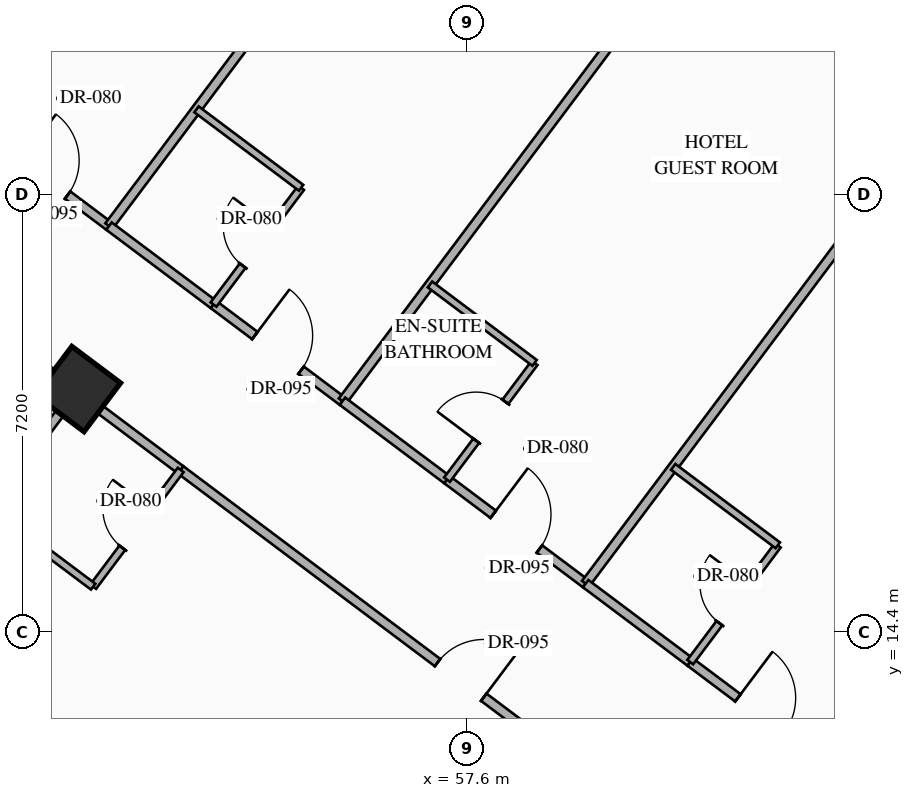
"""IFC4 building model, lengths in metres.
Left out: names, types, materials, properties, quantities, classifications, styles, units other than length and angle.
Written with IfcOpenShell. Run it as: python <this file> out.ifc"""

import sys

from ifc_helpers import new_model, si_unit, direction, frame, frame_2d, origin, origin_2d, place, context, subcontext, project, spatial, rectangle, hollow_rectangle, extrude, element, fill, save


model = new_model("IFC4")
c1 = context("Model", 3, precision=1e-05, world=origin(), true_north=direction((0.0, 1.0)))
c2 = subcontext(c1, "Body", "Model", "MODEL_VIEW")
j1 = project(units=[si_unit("LENGTHUNIT", "METRE"), si_unit("PLANEANGLEUNIT", "RADIAN")], contexts=[c1])
p1 = place(None, origin())
s1 = spatial("IfcSite", under=j1, at=p1, CompositionType="ELEMENT")
p2 = place(p1, origin())
s2 = spatial("IfcBuilding", under=s1, at=p2, CompositionType="ELEMENT")
p3 = place(p2, frame((0.0, 0.0, 43.3)))
s3 = spatial("IfcBuildingStorey", under=s2, at=p3, CompositionType="ELEMENT", Elevation=43.3)
p4 = place(p3, frame((51.2, 18.4, 0.0), z_axis=(0.0, 0.0, 1.0), x_axis=(0.799999996291, -0.600000004945, 0.0)))
e1 = element("IfcColumn", 1, at=p4, inside=s3, PredefinedType="COLUMN", context=c2, shape_type="SweptSolid", body=[
    extrude(hollow_rectangle(XDim=1.0, YDim=1.0, WallThickness=0.038, at=origin_2d()), origin(), (0.0, 0.0, 1.0), 3.35),
])
p5 = place(p3, frame((44.86, 40.73, 0.0), z_axis=(0.0, 0.0, 1.0), x_axis=(0.800006902154, -0.599990797017, 0.0)))
e2 = element("IfcWall", 2, at=p5, inside=s3, PredefinedType="STANDARD", context=c2, shape_type="SweptSolid", body=[
    extrude(rectangle(XDim=29.712, YDim=0.28, at=frame_2d((14.856, 0.0))), origin(), (0.0, 0.0, 1.0), 3.13),
])
p6 = place(p5, frame((14.249, 0.0, 0.0)))
e3 = element("IfcOpeningElement", 3, at=p6, cuts=e2, PredefinedType="OPENING", context=c2, shape_type="SweptSolid", body=[
    extrude(rectangle(XDim=1.1, YDim=2.2, at=frame_2d((0.55, 1.1))), frame((0.0, 0.15, 0.0), z_axis=(0.0, -1.0, 0.0), x_axis=(1.0, 0.0, 0.0)), (0.0, 0.0, 1.0), 0.3),
])
p7 = place(p5, frame((1.612, 0.0, 0.85)))
e4 = element("IfcOpeningElement", 4, at=p7, cuts=e2, PredefinedType="OPENING", context=c2, shape_type="SweptSolid", body=[
    extrude(rectangle(XDim=1.4, YDim=1.8, at=frame_2d((0.7, 0.9))), frame((0.0, 0.15, 0.0), z_axis=(0.0, -1.0, 0.0), x_axis=(1.0, 0.0, 0.0)), (0.0, 0.0, 1.0), 0.3),
])
p8 = place(p5, frame((5.667, 0.0, 0.85)))
e5 = element("IfcOpeningElement", 5, at=p8, cuts=e2, PredefinedType="OPENING", context=c2, shape_type="SweptSolid", body=[
    extrude(rectangle(XDim=1.4, YDim=1.8, at=frame_2d((0.7, 0.9))), frame((0.0, 0.15, 0.0), z_axis=(0.0, -1.0, 0.0), x_axis=(1.0, 0.0, 0.0)), (0.0, 0.0, 1.0), 0.3),
])
p9 = place(p5, frame((9.912, 0.0, 0.85)))
e6 = element("IfcOpeningElement", 6, at=p9, cuts=e2, PredefinedType="OPENING", context=c2, shape_type="SweptSolid", body=[
    extrude(rectangle(XDim=1.4, YDim=1.8, at=frame_2d((0.7, 0.9))), frame((0.0, 0.15, 0.0), z_axis=(0.0, -1.0, 0.0), x_axis=(1.0, 0.0, 0.0)), (0.0, 0.0, 1.0), 0.3),
])
p10 = place(p5, frame((19.528, 0.0, 0.85)))
e7 = element("IfcOpeningElement", 7, at=p10, cuts=e2, PredefinedType="OPENING", context=c2, shape_type="SweptSolid", body=[
    extrude(rectangle(XDim=1.4, YDim=1.8, at=frame_2d((0.7, 0.9))), frame((0.0, 0.15, 0.0), z_axis=(0.0, -1.0, 0.0), x_axis=(1.0, 0.0, 0.0)), (0.0, 0.0, 1.0), 0.3),
])
p11 = place(p5, frame((23.451, 0.0, 0.85)))
e8 = element("IfcOpeningElement", 8, at=p11, cuts=e2, PredefinedType="OPENING", context=c2, shape_type="SweptSolid", body=[
    extrude(rectangle(XDim=1.4, YDim=1.8, at=frame_2d((0.7, 0.9))), frame((0.0, 0.15, 0.0), z_axis=(0.0, -1.0, 0.0), x_axis=(1.0, 0.0, 0.0)), (0.0, 0.0, 1.0), 0.3),
])
p12 = place(p5, frame((27.852, 0.0, 0.85)))
e9 = element("IfcOpeningElement", 9, at=p12, cuts=e2, PredefinedType="OPENING", context=c2, shape_type="SweptSolid", body=[
    extrude(rectangle(XDim=1.4, YDim=1.8, at=frame_2d((0.7, 0.9))), frame((0.0, 0.15, 0.0), z_axis=(0.0, -1.0, 0.0), x_axis=(1.0, 0.0, 0.0)), (0.0, 0.0, 1.0), 0.3),
])
p13 = place(p3, frame((53.318, 2.487, 0.0), z_axis=(0.0, 0.0, 1.0), x_axis=(-0.800004174678, 0.599994433723, 0.0)))
e10 = element("IfcWall", 10, at=p13, inside=s3, PredefinedType="STANDARD", context=c2, shape_type="SweptSolid", body=[
    extrude(rectangle(XDim=35.089, YDim=0.28, at=frame_2d((17.544, 0.0))), origin(), (0.0, 0.0, 1.0), 3.13),
])
p14 = place(p13, frame((1.931, 0.0, 0.85)))
e11 = element("IfcOpeningElement", 11, at=p14, cuts=e10, PredefinedType="OPENING", context=c2, shape_type="SweptSolid", body=[
    extrude(rectangle(XDim=1.4, YDim=1.8, at=frame_2d((0.7, 0.9))), frame((0.0, 0.15, 0.0), z_axis=(0.0, -1.0, 0.0), x_axis=(1.0, 0.0, 0.0)), (0.0, 0.0, 1.0), 0.3),
])
p15 = place(p13, frame((6.819, 0.0, 0.85)))
e12 = element("IfcOpeningElement", 12, at=p15, cuts=e10, PredefinedType="OPENING", context=c2, shape_type="SweptSolid", body=[
    extrude(rectangle(XDim=1.4, YDim=1.8, at=frame_2d((0.7, 0.9))), frame((0.0, 0.15, 0.0), z_axis=(0.0, -1.0, 0.0), x_axis=(1.0, 0.0, 0.0)), (0.0, 0.0, 1.0), 0.3),
])
p16 = place(p13, frame((11.832, 0.0, 0.85)))
e13 = element("IfcOpeningElement", 13, at=p16, cuts=e10, PredefinedType="OPENING", context=c2, shape_type="SweptSolid", body=[
    extrude(rectangle(XDim=1.4, YDim=1.8, at=frame_2d((0.7, 0.9))), frame((0.0, 0.15, 0.0), z_axis=(0.0, -1.0, 0.0), x_axis=(1.0, 0.0, 0.0)), (0.0, 0.0, 1.0), 0.3),
])
p17 = place(p13, frame((17.647, 0.0, 0.85)))
e14 = element("IfcOpeningElement", 14, at=p17, cuts=e10, PredefinedType="OPENING", context=c2, shape_type="SweptSolid", body=[
    extrude(rectangle(XDim=1.4, YDim=1.8, at=frame_2d((0.7, 0.9))), frame((0.0, 0.15, 0.0), z_axis=(0.0, -1.0, 0.0), x_axis=(1.0, 0.0, 0.0)), (0.0, 0.0, 1.0), 0.3),
])
p18 = place(p13, frame((21.857, 0.0, 0.85)))
e15 = element("IfcOpeningElement", 15, at=p18, cuts=e10, PredefinedType="OPENING", context=c2, shape_type="SweptSolid", body=[
    extrude(rectangle(XDim=1.4, YDim=1.8, at=frame_2d((0.7, 0.9))), frame((0.0, 0.15, 0.0), z_axis=(0.0, -1.0, 0.0), x_axis=(1.0, 0.0, 0.0)), (0.0, 0.0, 1.0), 0.3),
])
p19 = place(p13, frame((26.87, 0.0, 0.85)))
e16 = element("IfcOpeningElement", 16, at=p19, cuts=e10, PredefinedType="OPENING", context=c2, shape_type="SweptSolid", body=[
    extrude(rectangle(XDim=1.4, YDim=1.8, at=frame_2d((0.7, 0.9))), frame((0.0, 0.15, 0.0), z_axis=(0.0, -1.0, 0.0), x_axis=(1.0, 0.0, 0.0)), (0.0, 0.0, 1.0), 0.3),
])
p20 = place(p13, frame((31.757, 0.0, 0.85)))
e17 = element("IfcOpeningElement", 17, at=p20, cuts=e10, PredefinedType="OPENING", context=c2, shape_type="SweptSolid", body=[
    extrude(rectangle(XDim=1.4, YDim=1.8, at=frame_2d((0.7, 0.9))), frame((0.0, 0.15, 0.0), z_axis=(0.0, -1.0, 0.0), x_axis=(1.0, 0.0, 0.0)), (0.0, 0.0, 1.0), 0.3),
])
p21 = place(p3, frame((49.59, 22.67, 0.0), z_axis=(0.0, 0.0, 1.0), x_axis=(0.800011056104, -0.599985258246, 0.0)))
e18 = element("IfcWall", 18, at=p21, inside=s3, PredefinedType="PARTITIONING", context=c2, shape_type="SweptSolid", body=[
    extrude(rectangle(XDim=2.65, YDim=0.15, at=frame_2d((1.325, 0.0))), origin(), (0.0, 0.0, 1.0), 2.775),
])
p22 = place(p21, frame((0.85, 0.0, 0.0)))
e19 = element("IfcOpeningElement", 19, at=p22, cuts=e18, PredefinedType="OPENING", context=c2, shape_type="SweptSolid", body=[
    extrude(rectangle(XDim=0.95, YDim=2.15, at=frame_2d((0.475, 1.075))), frame((0.0, 0.085, 0.0), z_axis=(0.0, -1.0, 0.0), x_axis=(1.0, 0.0, 0.0)), (0.0, 0.0, 1.0), 0.17),
])
p23 = place(p3, frame((49.59, 22.67, 0.0), z_axis=(0.0, 0.0, 1.0), x_axis=(0.599951172744, 0.800036618114, 0.0)))
e20 = element("IfcWall", 20, at=p23, inside=s3, PredefinedType="PARTITIONING", context=c2, shape_type="SweptSolid", body=[
    extrude(rectangle(XDim=2.4, YDim=0.12, at=frame_2d((1.2, 0.0))), origin(), (0.0, 0.0, 1.0), 3.13),
])
p24 = place(p23, frame((0.8, 0.0, 0.0)))
e21 = element("IfcOpeningElement", 21, at=p24, cuts=e20, PredefinedType="OPENING", context=c2, shape_type="SweptSolid", body=[
    extrude(rectangle(XDim=0.8, YDim=2.06, at=frame_2d((0.4, 1.03))), frame((0.0, 0.07, 0.0), z_axis=(0.0, -1.0, 0.0), x_axis=(1.0, 0.0, 0.0)), (0.0, 0.0, 1.0), 0.14),
])
for number, where, z_axis, x_axis in (
    (22, (47.87, 23.96, 0.0), (0.0, 0.0, 1.0), (0.6, 0.8, 0.0)),
    (23, (51.71, 21.08, 0.0), (0.0, 0.0, 1.0), (0.6, 0.8, 0.0)),
):
    element("IfcWall", number, at=place(p3, frame(where, z_axis=z_axis, x_axis=x_axis)), inside=s3, PredefinedType="PARTITIONING", context=c2, shape_type="SweptSolid", body=[
        extrude(rectangle(XDim=11.55, YDim=0.15, at=frame_2d((5.775, 0.0))), origin(), (0.0, 0.0, 1.0), 3.13),
    ])
p25 = place(p3, frame((51.71, 21.08, 0.0), z_axis=(0.0, 0.0, 1.0), x_axis=(0.79998637334, -0.60001816845, 0.0)))
e24 = element("IfcWall", 24, at=p25, inside=s3, PredefinedType="PARTITIONING", context=c2, shape_type="SweptSolid", body=[
    extrude(rectangle(XDim=2.15, YDim=0.15, at=frame_2d((1.075, 0.0))), origin(), (0.0, 0.0, 1.0), 2.775),
])
p26 = place(p3, frame((53.43, 19.79, 0.0), z_axis=(0.0, 0.0, 1.0), x_axis=(0.8, -0.6, 0.0)))
e25 = element("IfcWall", 25, at=p26, inside=s3, PredefinedType="PARTITIONING", context=c2, shape_type="SweptSolid", body=[
    extrude(rectangle(XDim=2.65, YDim=0.15, at=frame_2d((1.325, 0.0))), origin(), (0.0, 0.0, 1.0), 2.775),
])
p27 = place(p26, frame((0.85, 0.0, 0.0)))
e26 = element("IfcOpeningElement", 26, at=p27, cuts=e25, PredefinedType="OPENING", context=c2, shape_type="SweptSolid", body=[
    extrude(rectangle(XDim=0.95, YDim=2.15, at=frame_2d((0.475, 1.075))), frame((0.0, 0.085, 0.0), z_axis=(0.0, -1.0, 0.0), x_axis=(1.0, 0.0, 0.0)), (0.0, 0.0, 1.0), 0.17),
])
p28 = place(p3, frame((53.43, 19.79, 0.0), z_axis=(0.0, 0.0, 1.0), x_axis=(0.600065100855, 0.79995117022, 0.0)))
e27 = element("IfcWall", 27, at=p28, inside=s3, PredefinedType="PARTITIONING", context=c2, shape_type="SweptSolid", body=[
    extrude(rectangle(XDim=2.4, YDim=0.12, at=frame_2d((1.2, 0.0))), origin(), (0.0, 0.0, 1.0), 3.13),
])
p29 = place(p28, frame((0.8, 0.0, 0.0)))
e28 = element("IfcOpeningElement", 28, at=p29, cuts=e27, PredefinedType="OPENING", context=c2, shape_type="SweptSolid", body=[
    extrude(rectangle(XDim=0.8, YDim=2.06, at=frame_2d((0.4, 1.03))), frame((0.0, 0.07, 0.0), z_axis=(0.0, -1.0, 0.0), x_axis=(1.0, 0.0, 0.0)), (0.0, 0.0, 1.0), 0.14),
])
p30 = place(p3, frame((53.15, 23.0, 0.0), z_axis=(0.0, 0.0, 1.0), x_axis=(0.800027249606, -0.599963665473, 0.0)))
e29 = element("IfcWall", 29, at=p30, inside=s3, PredefinedType="PARTITIONING", context=c2, shape_type="SweptSolid", body=[
    extrude(rectangle(XDim=2.15, YDim=0.12, at=frame_2d((1.075, 0.0))), origin(), (0.0, 0.0, 1.0), 3.13),
])
p31 = place(p3, frame((55.55, 18.2, 0.0), z_axis=(0.0, 0.0, 1.0), x_axis=(0.599996617946, 0.80000253653, 0.0)))
e30 = element("IfcWall", 30, at=p31, inside=s3, PredefinedType="PARTITIONING", context=c2, shape_type="SweptSolid", body=[
    extrude(rectangle(XDim=11.55, YDim=0.15, at=frame_2d((5.775, 0.0))), origin(), (0.0, 0.0, 1.0), 3.13),
])
p32 = place(p3, frame((55.55, 18.2, 0.0), z_axis=(0.0, 0.0, 1.0), x_axis=(0.79998637334, -0.60001816845, 0.0)))
e31 = element("IfcWall", 31, at=p32, inside=s3, PredefinedType="PARTITIONING", context=c2, shape_type="SweptSolid", body=[
    extrude(rectangle(XDim=2.15, YDim=0.15, at=frame_2d((1.075, 0.0))), origin(), (0.0, 0.0, 1.0), 2.775),
])
p33 = place(p3, frame((57.27, 16.91, 0.0), z_axis=(0.0, 0.0, 1.0), x_axis=(0.800010279488, -0.599986293772, 0.0)))
e32 = element("IfcWall", 32, at=p33, inside=s3, PredefinedType="PARTITIONING", context=c2, shape_type="SweptSolid", body=[
    extrude(rectangle(XDim=2.85, YDim=0.15, at=frame_2d((1.425, 0.0))), origin(), (0.0, 0.0, 1.0), 2.775),
])
p34 = place(p33, frame((0.95, 0.0, 0.0)))
e33 = element("IfcOpeningElement", 33, at=p34, cuts=e32, PredefinedType="OPENING", context=c2, shape_type="SweptSolid", body=[
    extrude(rectangle(XDim=0.95, YDim=2.15, at=frame_2d((0.475, 1.075))), frame((0.0, 0.085, 0.0), z_axis=(0.0, -1.0, 0.0), x_axis=(1.0, 0.0, 0.0)), (0.0, 0.0, 1.0), 0.17),
])
p35 = place(p3, frame((57.27, 16.91, 0.0), z_axis=(0.0, 0.0, 1.0), x_axis=(0.599951172744, 0.800036618114, 0.0)))
e34 = element("IfcWall", 34, at=p35, inside=s3, PredefinedType="PARTITIONING", context=c2, shape_type="SweptSolid", body=[
    extrude(rectangle(XDim=2.4, YDim=0.12, at=frame_2d((1.2, 0.0))), origin(), (0.0, 0.0, 1.0), 3.13),
])
p36 = place(p35, frame((0.8, 0.0, 0.0)))
e35 = element("IfcOpeningElement", 35, at=p36, cuts=e34, PredefinedType="OPENING", context=c2, shape_type="SweptSolid", body=[
    extrude(rectangle(XDim=0.8, YDim=2.06, at=frame_2d((0.4, 1.03))), frame((0.0, 0.07, 0.0), z_axis=(0.0, -1.0, 0.0), x_axis=(1.0, 0.0, 0.0)), (0.0, 0.0, 1.0), 0.14),
])
p37 = place(p3, frame((56.99, 20.12, 0.0), z_axis=(0.0, 0.0, 1.0), x_axis=(0.79998637334, -0.60001816845, 0.0)))
e36 = element("IfcWall", 36, at=p37, inside=s3, PredefinedType="PARTITIONING", context=c2, shape_type="SweptSolid", body=[
    extrude(rectangle(XDim=2.15, YDim=0.12, at=frame_2d((1.075, 0.0))), origin(), (0.0, 0.0, 1.0), 3.13),
])
p38 = place(p3, frame((59.55, 15.2, 0.0), z_axis=(0.0, 0.0, 1.0), x_axis=(0.599996617946, 0.80000253653, 0.0)))
e37 = element("IfcWall", 37, at=p38, inside=s3, PredefinedType="PARTITIONING", context=c2, shape_type="SweptSolid", body=[
    extrude(rectangle(XDim=11.55, YDim=0.15, at=frame_2d((5.775, 0.0))), origin(), (0.0, 0.0, 1.0), 3.13),
])
p39 = place(p3, frame((59.55, 15.2, 0.0), z_axis=(0.0, 0.0, 1.0), x_axis=(0.79998637334, -0.60001816845, 0.0)))
e38 = element("IfcWall", 38, at=p39, inside=s3, PredefinedType="PARTITIONING", context=c2, shape_type="SweptSolid", body=[
    extrude(rectangle(XDim=2.15, YDim=0.15, at=frame_2d((1.075, 0.0))), origin(), (0.0, 0.0, 1.0), 2.775),
])
p40 = place(p3, frame((61.27, 13.91, 0.0), z_axis=(0.0, 0.0, 1.0), x_axis=(0.800010068184, -0.59998657552, 0.0)))
e39 = element("IfcWall", 39, at=p40, inside=s3, PredefinedType="PARTITIONING", context=c2, shape_type="SweptSolid", body=[
    extrude(rectangle(XDim=2.91, YDim=0.15, at=frame_2d((1.455, 0.0))), origin(), (0.0, 0.0, 1.0), 3.13),
])
p41 = place(p40, frame((0.98, 0.0, 0.0)))
e40 = element("IfcOpeningElement", 40, at=p41, cuts=e39, PredefinedType="OPENING", context=c2, shape_type="SweptSolid", body=[
    extrude(rectangle(XDim=0.95, YDim=2.15, at=frame_2d((0.475, 1.075))), frame((0.0, 0.085, 0.0), z_axis=(0.0, -1.0, 0.0), x_axis=(1.0, 0.0, 0.0)), (0.0, 0.0, 1.0), 0.17),
])
p42 = place(p3, frame((61.27, 13.91, 0.0), z_axis=(0.0, 0.0, 1.0), x_axis=(0.599951172744, 0.800036618114, 0.0)))
e41 = element("IfcWall", 41, at=p42, inside=s3, PredefinedType="PARTITIONING", context=c2, shape_type="SweptSolid", body=[
    extrude(rectangle(XDim=2.4, YDim=0.12, at=frame_2d((1.2, 0.0))), origin(), (0.0, 0.0, 1.0), 3.13),
])
p43 = place(p42, frame((0.8, 0.0, 0.0)))
e42 = element("IfcOpeningElement", 42, at=p43, cuts=e41, PredefinedType="OPENING", context=c2, shape_type="SweptSolid", body=[
    extrude(rectangle(XDim=0.8, YDim=2.06, at=frame_2d((0.4, 1.03))), frame((0.0, 0.07, 0.0), z_axis=(0.0, -1.0, 0.0), x_axis=(1.0, 0.0, 0.0)), (0.0, 0.0, 1.0), 0.14),
])
p44 = place(p3, frame((60.99, 17.12, 0.0), z_axis=(0.0, 0.0, 1.0), x_axis=(0.79998637334, -0.60001816845, 0.0)))
e43 = element("IfcWall", 43, at=p44, inside=s3, PredefinedType="PARTITIONING", context=c2, shape_type="SweptSolid", body=[
    extrude(rectangle(XDim=2.15, YDim=0.12, at=frame_2d((1.075, 0.0))), origin(), (0.0, 0.0, 1.0), 3.13),
])
p45 = place(p3, frame((49.45, 19.65, 0.0), z_axis=(0.0, 0.0, 1.0), x_axis=(0.800040880289, -0.59994548908, 0.0)))
e44 = element("IfcWall", 44, at=p45, inside=s3, PredefinedType="PARTITIONING", context=c2, shape_type="SweptSolid", body=[
    extrude(rectangle(XDim=2.15, YDim=0.15, at=frame_2d((1.075, 0.0))), origin(), (0.0, 0.0, 1.0), 2.425),
])
p46 = place(p3, frame((44.36, 9.28, 0.0), z_axis=(0.0, 0.0, 1.0), x_axis=(0.599986233332, 0.800010324816, 0.0)))
e45 = element("IfcWall", 45, at=p46, inside=s3, PredefinedType="PARTITIONING", context=c2, shape_type="SweptSolid", body=[
    extrude(rectangle(XDim=11.35, YDim=0.15, at=frame_2d((5.675, 0.0))), origin(), (0.0, 0.0, 1.0), 2.425),
])
p47 = place(p3, frame((51.17, 18.36, 0.0), z_axis=(0.0, 0.0, 1.0), x_axis=(0.79998637334, -0.60001816845, 0.0)))
e46 = element("IfcWall", 46, at=p47, inside=s3, PredefinedType="PARTITIONING", context=c2, shape_type="SweptSolid", body=[
    extrude(rectangle(XDim=2.15, YDim=0.15, at=frame_2d((1.075, 0.0))), origin(), (0.0, 0.0, 1.0), 2.425),
])
p48 = place(p3, frame((52.89, 17.07, 0.0), z_axis=(0.0, 0.0, 1.0), x_axis=(0.8, -0.6, 0.0)))
e47 = element("IfcWall", 47, at=p48, inside=s3, PredefinedType="PARTITIONING", context=c2, shape_type="SweptSolid", body=[
    extrude(rectangle(XDim=11.51, YDim=0.15, at=frame_2d((5.755, 0.0))), origin(), (0.0, 0.0, 1.0), 2.425),
])
p49 = place(p48, frame((5.28, 0.0, 0.0)))
e48 = element("IfcOpeningElement", 48, at=p49, cuts=e47, PredefinedType="OPENING", context=c2, shape_type="SweptSolid", body=[
    extrude(rectangle(XDim=0.95, YDim=2.15, at=frame_2d((0.475, 1.075))), frame((0.0, 0.085, 0.0), z_axis=(0.0, -1.0, 0.0), x_axis=(1.0, 0.0, 0.0)), (0.0, 0.0, 1.0), 0.17),
])
p50 = place(p3, frame((51.45, 15.15, 0.0), z_axis=(0.0, 0.0, 1.0), x_axis=(0.599951172744, 0.800036618114, 0.0)))
e49 = element("IfcWall", 49, at=p50, inside=s3, PredefinedType="PARTITIONING", context=c2, shape_type="SweptSolid", body=[
    extrude(rectangle(XDim=2.4, YDim=0.12, at=frame_2d((1.2, 0.0))), origin(), (0.0, 0.0, 1.0), 3.13),
])
p51 = place(p50, frame((0.8, 0.0, 0.0)))
e50 = element("IfcOpeningElement", 50, at=p51, cuts=e49, PredefinedType="OPENING", context=c2, shape_type="SweptSolid", body=[
    extrude(rectangle(XDim=0.8, YDim=2.06, at=frame_2d((0.4, 1.03))), frame((0.0, 0.07, 0.0), z_axis=(0.0, -1.0, 0.0), x_axis=(1.0, 0.0, 0.0)), (0.0, 0.0, 1.0), 0.14),
])
p52 = place(p3, frame((49.73, 16.44, 0.0), z_axis=(0.0, 0.0, 1.0), x_axis=(0.79998637334, -0.60001816845, 0.0)))
e51 = element("IfcWall", 51, at=p52, inside=s3, PredefinedType="PARTITIONING", context=c2, shape_type="SweptSolid", body=[
    extrude(rectangle(XDim=2.15, YDim=0.12, at=frame_2d((1.075, 0.0))), origin(), (0.0, 0.0, 1.0), 3.13),
])
p53 = place(p22, origin())
e52 = element("IfcDoor", 52, at=p53, inside=s3, OperationType="SINGLE_SWING_LEFT", PredefinedType="DOOR", context=c2, shape_type="SweptSolid", body=[
    extrude(rectangle(XDim=0.95, YDim=2.15, at=frame_2d((0.475, 1.075))), frame((0.0, 0.025, 0.0), z_axis=(0.0, -1.0, 0.0), x_axis=(1.0, 0.0, 0.0)), (0.0, 0.0, 1.0), 0.05),
])
fill(e19, e52)
p54 = place(p27, origin())
e53 = element("IfcDoor", 53, at=p54, inside=s3, OperationType="SINGLE_SWING_LEFT", PredefinedType="DOOR", context=c2, shape_type="SweptSolid", body=[
    extrude(rectangle(XDim=0.95, YDim=2.15, at=frame_2d((0.475, 1.075))), frame((0.0, 0.025, 0.0), z_axis=(0.0, -1.0, 0.0), x_axis=(1.0, 0.0, 0.0)), (0.0, 0.0, 1.0), 0.05),
])
fill(e26, e53)
p55 = place(p29, origin())
e54 = element("IfcDoor", 54, at=p55, inside=s3, OperationType="SINGLE_SWING_RIGHT", PredefinedType="DOOR", context=c2, shape_type="SweptSolid", body=[
    extrude(rectangle(XDim=0.8, YDim=2.06, at=frame_2d((0.4, 1.03))), frame((0.0, 0.025, 0.0), z_axis=(0.0, -1.0, 0.0), x_axis=(1.0, 0.0, 0.0)), (0.0, 0.0, 1.0), 0.05),
])
fill(e28, e54)
p56 = place(p34, origin())
e55 = element("IfcDoor", 55, at=p56, inside=s3, OperationType="SINGLE_SWING_LEFT", PredefinedType="DOOR", context=c2, shape_type="SweptSolid", body=[
    extrude(rectangle(XDim=0.95, YDim=2.15, at=frame_2d((0.475, 1.075))), frame((0.0, 0.025, 0.0), z_axis=(0.0, -1.0, 0.0), x_axis=(1.0, 0.0, 0.0)), (0.0, 0.0, 1.0), 0.05),
])
fill(e33, e55)
p57 = place(p36, origin())
e56 = element("IfcDoor", 56, at=p57, inside=s3, OperationType="SINGLE_SWING_LEFT", PredefinedType="DOOR", context=c2, shape_type="SweptSolid", body=[
    extrude(rectangle(XDim=0.8, YDim=2.06, at=frame_2d((0.4, 1.03))), frame((0.0, 0.025, 0.0), z_axis=(0.0, -1.0, 0.0), x_axis=(1.0, 0.0, 0.0)), (0.0, 0.0, 1.0), 0.05),
])
fill(e35, e56)
p58 = place(p41, origin())
e57 = element("IfcDoor", 57, at=p58, inside=s3, OperationType="SINGLE_SWING_LEFT", PredefinedType="DOOR", context=c2, shape_type="SweptSolid", body=[
    extrude(rectangle(XDim=0.95, YDim=2.15, at=frame_2d((0.475, 1.075))), frame((0.0, 0.025, 0.0), z_axis=(0.0, -1.0, 0.0), x_axis=(1.0, 0.0, 0.0)), (0.0, 0.0, 1.0), 0.05),
])
fill(e40, e57)
p59 = place(p43, origin())
e58 = element("IfcDoor", 58, at=p59, inside=s3, OperationType="SINGLE_SWING_RIGHT", PredefinedType="DOOR", context=c2, shape_type="SweptSolid", body=[
    extrude(rectangle(XDim=0.8, YDim=2.06, at=frame_2d((0.4, 1.03))), frame((0.0, 0.025, 0.0), z_axis=(0.0, -1.0, 0.0), x_axis=(1.0, 0.0, 0.0)), (0.0, 0.0, 1.0), 0.05),
])
fill(e42, e58)
p60 = place(p49, origin())
e59 = element("IfcDoor", 59, at=p60, inside=s3, OperationType="SINGLE_SWING_RIGHT", PredefinedType="DOOR", context=c2, shape_type="SweptSolid", body=[
    extrude(rectangle(XDim=0.95, YDim=2.15, at=frame_2d((0.475, 1.075))), frame((0.0, 0.025, 0.0), z_axis=(0.0, -1.0, 0.0), x_axis=(1.0, 0.0, 0.0)), (0.0, 0.0, 1.0), 0.05),
])
fill(e48, e59)
p61 = place(p51, origin())
e60 = element("IfcDoor", 60, at=p61, inside=s3, OperationType="SINGLE_SWING_RIGHT", PredefinedType="DOOR", context=c2, shape_type="SweptSolid", body=[
    extrude(rectangle(XDim=0.8, YDim=2.06, at=frame_2d((0.4, 1.03))), frame((0.0, 0.025, 0.0), z_axis=(0.0, -1.0, 0.0), x_axis=(1.0, 0.0, 0.0)), (0.0, 0.0, 1.0), 0.05),
])
fill(e50, e60)
save(model, sys.argv[1])
